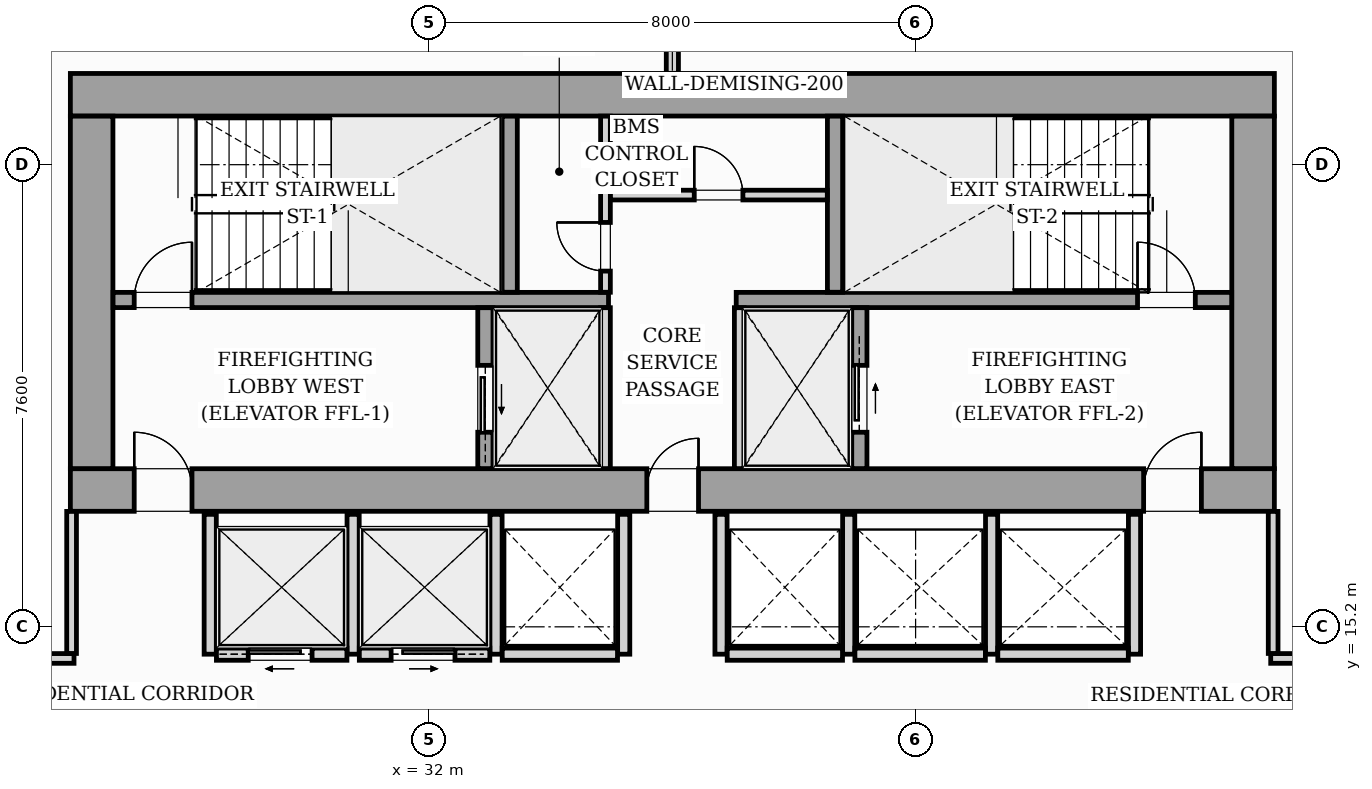
"""IFC4 building model, lengths in metres.
Left out: names, types, materials, properties, quantities, classifications, styles, units other than length and angle.
Written with IfcOpenShell. Run it as: python <this file> out.ifc"""

import sys

from ifc_helpers import new_model, si_unit, direction, frame, frame_2d, origin, origin_2d, place, context, subcontext, project, spatial, rectangle, i_section, extrude, source, transform, mapped, element, fill, save


model = new_model("IFC4")
c1 = context("Model", 3, precision=1e-05, world=origin(), true_north=direction((0.0, 1.0)))
c2 = subcontext(c1, "Body", "Model", "MODEL_VIEW")
j1 = project(units=[si_unit("LENGTHUNIT", "METRE"), si_unit("PLANEANGLEUNIT", "RADIAN")], contexts=[c1])
p1 = place(None, origin())
s1 = spatial("IfcSite", under=j1, at=p1, CompositionType="ELEMENT")
p2 = place(p1, origin())
s2 = spatial("IfcBuilding", under=s1, at=p2, CompositionType="ELEMENT")
p3 = place(p2, frame((0.0, 0.0, 77.8)))
s3 = spatial("IfcBuildingStorey", under=s2, at=p3, CompositionType="ELEMENT", Elevation=77.8)
m1 = source(origin(), c2, "Body", "SweptSolid", [
    extrude(i_section(OverallWidth=0.427, OverallDepth=0.483, WebThickness=0.051, FlangeThickness=0.082, FilletRadius=0.018, at=origin_2d()), origin(), (0.0, 0.0, 1.0), 3.196),
])
for number, where, z_axis, x_axis in (
    (1, (26.4, 17.4, 0.002), (0.0, 0.0, 1.0), (1.0, 0.0, 0.0)),
    (2, (33.12, 17.4, 0.002), (0.0, 0.0, 1.0), (1.0, 0.0, 0.0)),
    (3, (38.88, 17.4, 0.002), (0.0, 0.0, 1.0), (1.0, 0.0, 0.0)),
    (4, (45.6, 17.4, 0.002), (0.0, 0.0, 1.0), (1.0, 0.0, 0.0)),
    (5, (26.4, 24.0, 0.002), (0.0, 0.0, 1.0), (1.0, 0.0, 0.0)),
    (6, (33.12, 24.0, 0.002), (0.0, 0.0, 1.0), (1.0, 0.0, 0.0)),
    (7, (38.88, 24.0, 0.002), (0.0, 0.0, 1.0), (1.0, 0.0, 0.0)),
    (8, (45.6, 24.0, 0.002), (0.0, 0.0, 1.0), (1.0, 0.0, 0.0)),
):
    element("IfcColumn", number, at=place(p3, frame(where, z_axis=z_axis, x_axis=x_axis)), inside=s3, PredefinedType="PILASTER", context=c2, shape_type="MappedRepresentation", body=[
        mapped(m1, transform((0.0, 0.0, 0.0), scale=1.0)),
    ])
p4 = place(p3, frame((11.08, 23.508, 0.0), z_axis=(0.0, 0.0, 1.0), x_axis=(0.995396638587, 0.095841180552, 0.0)))
e9 = element("IfcWall", 9, at=p4, inside=s3, PredefinedType="STANDARD", context=c2, shape_type="SweptSolid", body=[
    extrude(rectangle(XDim=19.11, YDim=0.26, at=frame_2d((9.555, 0.0))), origin(), (0.0, 0.0, 1.0), 2.94),
])
p5 = place(p4, frame((6.896, 0.0, 0.0)))
e10 = element("IfcOpeningElement", 10, at=p5, cuts=e9, PredefinedType="OPENING", context=c2, shape_type="SweptSolid", body=[
    extrude(rectangle(XDim=1.8, YDim=2.06, at=frame_2d((0.9, 1.03))), frame((0.0, 0.14, 0.0), z_axis=(0.0, -1.0, 0.0), x_axis=(1.0, 0.0, 0.0)), (0.0, 0.0, 1.0), 0.28),
])
p6 = place(p4, frame((2.05, 0.0, 0.65)))
e11 = element("IfcOpeningElement", 11, at=p6, cuts=e9, PredefinedType="OPENING", context=c2, shape_type="SweptSolid", body=[
    extrude(rectangle(XDim=1.6, YDim=1.5, at=frame_2d((0.8, 0.75))), frame((0.0, 0.14, 0.0), z_axis=(0.0, -1.0, 0.0), x_axis=(1.0, 0.0, 0.0)), (0.0, 0.0, 1.0), 0.28),
])
p7 = place(p3, frame((26.1, 17.45, 0.0), z_axis=(0.0, 0.0, 1.0), x_axis=(1.0, 0.0, 0.0)))
e12 = element("IfcWall", 12, at=p7, inside=s3, PredefinedType="SHEAR", context=c2, shape_type="SweptSolid", body=[
    extrude(rectangle(XDim=19.8, YDim=0.7, at=frame_2d((9.9, 0.0))), origin(), (0.0, 0.0, 1.0), 3.2),
])
p8 = place(p7, frame((1.05, 0.0, 0.0)))
e13 = element("IfcOpeningElement", 13, at=p8, cuts=e12, PredefinedType="OPENING", context=c2, shape_type="SweptSolid", body=[
    extrude(rectangle(XDim=0.95, YDim=2.06, at=frame_2d((0.475, 1.03))), frame((0.0, 0.36, 0.0), z_axis=(0.0, -1.0, 0.0), x_axis=(1.0, 0.0, 0.0)), (0.0, 0.0, 1.0), 0.72),
])
p9 = place(p7, frame((9.48, 0.0, 0.0)))
e14 = element("IfcOpeningElement", 14, at=p9, cuts=e12, PredefinedType="OPENING", context=c2, shape_type="SweptSolid", body=[
    extrude(rectangle(XDim=0.85, YDim=2.0, at=frame_2d((0.425, 1.0))), frame((0.0, 0.36, 0.0), z_axis=(0.0, -1.0, 0.0), x_axis=(1.0, 0.0, 0.0)), (0.0, 0.0, 1.0), 0.72),
])
p10 = place(p7, frame((17.65, 0.0, 0.0)))
e15 = element("IfcOpeningElement", 15, at=p10, cuts=e12, PredefinedType="OPENING", context=c2, shape_type="SweptSolid", body=[
    extrude(rectangle(XDim=0.95, YDim=2.06, at=frame_2d((0.475, 1.03))), frame((0.0, 0.36, 0.0), z_axis=(0.0, -1.0, 0.0), x_axis=(1.0, 0.0, 0.0)), (0.0, 0.0, 1.0), 0.72),
])
p11 = place(p3, frame((26.1, 23.95, 0.0), z_axis=(0.0, 0.0, 1.0), x_axis=(1.0, 0.0, 0.0)))
e16 = element("IfcWall", 16, at=p11, inside=s3, PredefinedType="SHEAR", context=c2, shape_type="SweptSolid", body=[
    extrude(rectangle(XDim=19.8, YDim=0.7, at=frame_2d((9.9, 0.0))), origin(), (0.0, 0.0, 1.0), 3.2),
])
for number, where, z_axis, x_axis in (
    (17, (26.45, 17.802, 0.0), (0.0, 0.0, 1.0), (0.0, 1.0, 0.0)),
    (18, (45.55, 17.802, 0.0), (0.0, 0.0, 1.0), (0.0, 1.0, 0.0)),
):
    element("IfcWall", number, at=place(p3, frame(where, z_axis=z_axis, x_axis=x_axis)), inside=s3, PredefinedType="SHEAR", context=c2, shape_type="SweptSolid", body=[
        extrude(rectangle(XDim=5.796, YDim=0.7, at=frame_2d((2.898, 0.0))), origin(), (0.0, 0.0, 1.0), 3.2),
    ])
p12 = place(p3, frame((26.802, 20.575, 0.0), z_axis=(0.0, 0.0, 1.0), x_axis=(1.0, 0.0, 0.0)))
e19 = element("IfcWall", 19, at=p12, inside=s3, PredefinedType="SOLIDWALL", context=c2, shape_type="SweptSolid", body=[
    extrude(rectangle(XDim=8.148, YDim=0.25, at=frame_2d((4.074, 0.0))), origin(), (0.0, 0.0, 1.0), 3.2),
])
p13 = place(p12, frame((0.348, 0.0, 0.0)))
e20 = element("IfcOpeningElement", 20, at=p13, cuts=e19, PredefinedType="OPENING", context=c2, shape_type="SweptSolid", body=[
    extrude(rectangle(XDim=0.95, YDim=2.06, at=frame_2d((0.475, 1.03))), frame((0.0, 0.135, 0.0), z_axis=(0.0, -1.0, 0.0), x_axis=(1.0, 0.0, 0.0)), (0.0, 0.0, 1.0), 0.27),
])
p14 = place(p3, frame((37.05, 20.575, 0.0), z_axis=(0.0, 0.0, 1.0), x_axis=(1.0, 0.0, 0.0)))
e21 = element("IfcWall", 21, at=p14, inside=s3, PredefinedType="SOLIDWALL", context=c2, shape_type="SweptSolid", body=[
    extrude(rectangle(XDim=8.148, YDim=0.25, at=frame_2d((4.074, 0.0))), origin(), (0.0, 0.0, 1.0), 3.2),
])
p15 = place(p14, frame((6.6, 0.0, 0.0)))
e22 = element("IfcOpeningElement", 22, at=p15, cuts=e21, PredefinedType="OPENING", context=c2, shape_type="SweptSolid", body=[
    extrude(rectangle(XDim=0.95, YDim=2.06, at=frame_2d((0.475, 1.03))), frame((0.0, 0.135, 0.0), z_axis=(0.0, -1.0, 0.0), x_axis=(1.0, 0.0, 0.0)), (0.0, 0.0, 1.0), 0.27),
])
for number, where, z_axis, x_axis in (
    (23, (33.325, 20.702, 0.0), (0.0, 0.0, 1.0), (0.0, 1.0, 0.0)),
    (24, (38.675, 20.702, 0.0), (0.0, 0.0, 1.0), (0.0, 1.0, 0.0)),
):
    element("IfcWall", number, at=place(p3, frame(where, z_axis=z_axis, x_axis=x_axis)), inside=s3, PredefinedType="SOLIDWALL", context=c2, shape_type="SweptSolid", body=[
        extrude(rectangle(XDim=2.896, YDim=0.25, at=frame_2d((1.448, 0.0))), origin(), (0.0, 0.0, 1.0), 3.2),
    ])
p16 = place(p3, frame((32.925, 17.802, 0.0), z_axis=(0.0, 0.0, 1.0), x_axis=(0.0, 1.0, 0.0)))
e25 = element("IfcWall", 25, at=p16, inside=s3, PredefinedType="SOLIDWALL", context=c2, shape_type="SweptSolid", body=[
    extrude(rectangle(XDim=2.646, YDim=0.25, at=frame_2d((1.323, 0.0))), origin(), (0.0, 0.0, 1.0), 3.2),
])
p17 = place(p16, frame((0.598, 0.0, 0.0)))
e26 = element("IfcOpeningElement", 26, at=p17, cuts=e25, PredefinedType="OPENING", context=c2, shape_type="SweptSolid", body=[
    extrude(rectangle(XDim=1.1, YDim=2.08, at=frame_2d((0.55, 1.04))), frame((0.0, 0.135, 0.0), z_axis=(0.0, -1.0, 0.0), x_axis=(1.0, 0.0, 0.0)), (0.0, 0.0, 1.0), 0.27),
])
for number, where, z_axis, x_axis in (
    (27, (34.9, 17.802, 0.0), (0.0, 0.0, 1.0), (0.0, 1.0, 0.0)),
    (28, (37.1, 17.802, 0.0), (0.0, 0.0, 1.0), (0.0, 1.0, 0.0)),
):
    element("IfcWall", number, at=place(p3, frame(where, z_axis=z_axis, x_axis=x_axis)), inside=s3, PredefinedType="PARTITIONING", context=c2, shape_type="SweptSolid", body=[
        extrude(rectangle(XDim=2.646, YDim=0.16, at=frame_2d((1.323, 0.0))), origin(), (0.0, 0.0, 1.0), 2.94),
    ])
p18 = place(p3, frame((39.075, 17.802, 0.0), z_axis=(0.0, 0.0, 1.0), x_axis=(0.0, 1.0, 0.0)))
e29 = element("IfcWall", 29, at=p18, inside=s3, PredefinedType="SOLIDWALL", context=c2, shape_type="SweptSolid", body=[
    extrude(rectangle(XDim=2.646, YDim=0.25, at=frame_2d((1.323, 0.0))), origin(), (0.0, 0.0, 1.0), 3.2),
])
p19 = place(p18, frame((0.598, 0.0, 0.0)))
e30 = element("IfcOpeningElement", 30, at=p19, cuts=e29, PredefinedType="OPENING", context=c2, shape_type="SweptSolid", body=[
    extrude(rectangle(XDim=1.1, YDim=2.08, at=frame_2d((0.55, 1.04))), frame((0.0, 0.135, 0.0), z_axis=(0.0, -1.0, 0.0), x_axis=(1.0, 0.0, 0.0)), (0.0, 0.0, 1.0), 0.27),
])
p20 = place(p3, frame((34.9, 20.702, 0.0), z_axis=(0.0, 0.0, 1.0), x_axis=(0.0, 1.0, 0.0)))
e31 = element("IfcWall", 31, at=p20, inside=s3, PredefinedType="PARTITIONING", context=c2, shape_type="SweptSolid", body=[
    extrude(rectangle(XDim=2.896, YDim=0.16, at=frame_2d((1.448, 0.0))), origin(), (0.0, 0.0, 1.0), 2.94),
])
p21 = place(p20, frame((0.348, 0.0, 0.0)))
e32 = element("IfcOpeningElement", 32, at=p21, cuts=e31, PredefinedType="OPENING", context=c2, shape_type="SweptSolid", body=[
    extrude(rectangle(XDim=0.8, YDim=2.05, at=frame_2d((0.4, 1.025))), frame((0.0, 0.09, 0.0), z_axis=(0.0, -1.0, 0.0), x_axis=(1.0, 0.0, 0.0)), (0.0, 0.0, 1.0), 0.18),
])
p22 = place(p3, frame((34.982, 22.3, 0.0), z_axis=(0.0, 0.0, 1.0), x_axis=(1.0, 0.0, 0.0)))
e33 = element("IfcWall", 33, at=p22, inside=s3, PredefinedType="PARTITIONING", context=c2, shape_type="SweptSolid", body=[
    extrude(rectangle(XDim=3.566, YDim=0.16, at=frame_2d((1.783, 0.0))), origin(), (0.0, 0.0, 1.0), 2.94),
])
p23 = place(p22, frame((1.378, 0.0, 0.0)))
e34 = element("IfcOpeningElement", 34, at=p23, cuts=e33, PredefinedType="OPENING", context=c2, shape_type="SweptSolid", body=[
    extrude(rectangle(XDim=0.8, YDim=2.05, at=frame_2d((0.4, 1.025))), frame((0.0, 0.09, 0.0), z_axis=(0.0, -1.0, 0.0), x_axis=(1.0, 0.0, 0.0)), (0.0, 0.0, 1.0), 0.18),
])
for number, where, z_axis, x_axis in (
    (35, (28.4, 14.75, 0.0), (0.0, 0.0, 1.0), (0.0, 1.0, 0.0)),
    (36, (30.75, 14.75, 0.0), (0.0, 0.0, 1.0), (0.0, 1.0, 0.0)),
    (37, (33.1, 14.75, 0.0), (0.0, 0.0, 1.0), (0.0, 1.0, 0.0)),
):
    element("IfcWall", number, at=place(p3, frame(where, z_axis=z_axis, x_axis=x_axis)), inside=s3, PredefinedType="PARTITIONING", context=c2, shape_type="SweptSolid", body=[
        extrude(rectangle(XDim=2.3, YDim=0.2, at=frame_2d((1.15, 0.0))), origin(), (0.0, 0.0, 1.0), 2.94),
    ])
p24 = place(p3, frame((28.502, 14.75, 0.0), z_axis=(0.0, 0.0, 1.0), x_axis=(1.0, 0.0, 0.0)))
e38 = element("IfcWall", 38, at=p24, inside=s3, PredefinedType="PARTITIONING", context=c2, shape_type="SweptSolid", body=[
    extrude(rectangle(XDim=2.146, YDim=0.2, at=frame_2d((1.073, 0.0))), origin(), (0.0, 0.0, 1.0), 2.94),
])
p25 = place(p24, frame((0.523, 0.0, 0.0)))
e39 = element("IfcOpeningElement", 39, at=p25, cuts=e38, PredefinedType="OPENING", context=c2, shape_type="SweptSolid", body=[
    extrude(rectangle(XDim=1.05, YDim=2.08, at=frame_2d((0.525, 1.04))), frame((0.0, 0.11, 0.0), z_axis=(0.0, -1.0, 0.0), x_axis=(1.0, 0.0, 0.0)), (0.0, 0.0, 1.0), 0.22),
])
p26 = place(p3, frame((30.852, 14.75, 0.0), z_axis=(0.0, 0.0, 1.0), x_axis=(1.0, 0.0, 0.0)))
e40 = element("IfcWall", 40, at=p26, inside=s3, PredefinedType="PARTITIONING", context=c2, shape_type="SweptSolid", body=[
    extrude(rectangle(XDim=2.146, YDim=0.2, at=frame_2d((1.073, 0.0))), origin(), (0.0, 0.0, 1.0), 2.94),
])
p27 = place(p26, frame((0.523, 0.0, 0.0)))
e41 = element("IfcOpeningElement", 41, at=p27, cuts=e40, PredefinedType="OPENING", context=c2, shape_type="SweptSolid", body=[
    extrude(rectangle(XDim=1.05, YDim=2.08, at=frame_2d((0.525, 1.04))), frame((0.0, 0.11, 0.0), z_axis=(0.0, -1.0, 0.0), x_axis=(1.0, 0.0, 0.0)), (0.0, 0.0, 1.0), 0.22),
])
p28 = place(p3, frame((35.2, 14.75, 0.0), z_axis=(0.0, 0.0, 1.0), x_axis=(0.0, 1.0, 0.0)))
e42 = element("IfcWall", 42, at=p28, inside=s3, PredefinedType="PARTITIONING", context=c2, shape_type="SweptSolid", body=[
    extrude(rectangle(XDim=2.3, YDim=0.2, at=frame_2d((1.15, 0.0))), origin(), (0.0, 0.0, 1.0), 2.94),
])
p29 = place(p3, frame((33.202, 14.75, 0.0), z_axis=(0.0, 0.0, 1.0), x_axis=(1.0, 0.0, 0.0)))
e43 = element("IfcWall", 43, at=p29, inside=s3, PredefinedType="PARTITIONING", context=c2, shape_type="SweptSolid", body=[
    extrude(rectangle(XDim=1.896, YDim=0.2, at=frame_2d((0.948, 0.0))), origin(), (0.0, 0.0, 1.0), 2.94),
])
for number, where, z_axis, x_axis in (
    (44, (36.8, 14.75, 0.0), (0.0, 0.0, 1.0), (0.0, 1.0, 0.0)),
    (45, (38.9, 14.75, 0.0), (0.0, 0.0, 1.0), (0.0, 1.0, 0.0)),
):
    element("IfcWall", number, at=place(p3, frame(where, z_axis=z_axis, x_axis=x_axis)), inside=s3, PredefinedType="PARTITIONING", context=c2, shape_type="SweptSolid", body=[
        extrude(rectangle(XDim=2.3, YDim=0.2, at=frame_2d((1.15, 0.0))), origin(), (0.0, 0.0, 1.0), 2.94),
    ])
p30 = place(p3, frame((36.902, 14.75, 0.0), z_axis=(0.0, 0.0, 1.0), x_axis=(1.0, 0.0, 0.0)))
e46 = element("IfcWall", 46, at=p30, inside=s3, PredefinedType="PARTITIONING", context=c2, shape_type="SweptSolid", body=[
    extrude(rectangle(XDim=1.896, YDim=0.2, at=frame_2d((0.948, 0.0))), origin(), (0.0, 0.0, 1.0), 2.94),
])
for number, where, z_axis, x_axis in (
    (47, (41.25, 14.75, 0.0), (0.0, 0.0, 1.0), (0.0, 1.0, 0.0)),
    (48, (43.6, 14.75, 0.0), (0.0, 0.0, 1.0), (0.0, 1.0, 0.0)),
):
    element("IfcWall", number, at=place(p3, frame(where, z_axis=z_axis, x_axis=x_axis)), inside=s3, PredefinedType="PARTITIONING", context=c2, shape_type="SweptSolid", body=[
        extrude(rectangle(XDim=2.3, YDim=0.2, at=frame_2d((1.15, 0.0))), origin(), (0.0, 0.0, 1.0), 2.94),
    ])
for number, where, z_axis, x_axis in (
    (49, (39.002, 14.75, 0.0), (0.0, 0.0, 1.0), (1.0, 0.0, 0.0)),
    (50, (41.352, 14.75, 0.0), (0.0, 0.0, 1.0), (1.0, 0.0, 0.0)),
):
    element("IfcWall", number, at=place(p3, frame(where, z_axis=z_axis, x_axis=x_axis)), inside=s3, PredefinedType="PARTITIONING", context=c2, shape_type="SweptSolid", body=[
        extrude(rectangle(XDim=2.146, YDim=0.2, at=frame_2d((1.073, 0.0))), origin(), (0.0, 0.0, 1.0), 2.94),
    ])
p31 = place(p3, frame((36.0, 24.302, 0.0), z_axis=(0.0, 0.0, 1.0), x_axis=(0.0, 1.0, 0.0)))
e51 = element("IfcWall", 51, at=p31, inside=s3, PredefinedType="PARTITIONING", context=c2, shape_type="SweptSolid", body=[
    extrude(rectangle(XDim=1.656, YDim=0.2, at=frame_2d((0.828, 0.0))), origin(), (0.0, 0.0, 1.0), 2.94),
])
p32 = place(p3, frame((16.682, 14.68, 0.0), z_axis=(0.0, 0.0, 1.0), x_axis=(1.0, 0.0, 0.0)))
e52 = element("IfcWall", 52, at=p32, inside=s3, PredefinedType="PARTITIONING", context=c2, shape_type="SweptSolid", body=[
    extrude(rectangle(XDim=9.478, YDim=0.16, at=frame_2d((4.739, 0.0))), origin(), (0.0, 0.0, 1.0), 2.94),
])
p33 = place(p32, frame((4.163, 0.0, 0.0)))
e53 = element("IfcOpeningElement", 53, at=p33, cuts=e52, PredefinedType="OPENING", context=c2, shape_type="SweptSolid", body=[
    extrude(rectangle(XDim=0.95, YDim=2.06, at=frame_2d((0.475, 1.03))), frame((0.0, 0.09, 0.0), z_axis=(0.0, -1.0, 0.0), x_axis=(1.0, 0.0, 0.0)), (0.0, 0.0, 1.0), 0.18),
])
p34 = place(p3, frame((26.12, 14.762, 0.0), z_axis=(0.0, 0.0, 1.0), x_axis=(0.0, 1.0, 0.0)))
e54 = element("IfcWall", 54, at=p34, inside=s3, PredefinedType="PARTITIONING", context=c2, shape_type="SweptSolid", body=[
    extrude(rectangle(XDim=2.336, YDim=0.16, at=frame_2d((1.168, 0.0))), origin(), (0.0, 0.0, 1.0), 2.94),
])
p35 = place(p3, frame((45.84, 14.68, 0.0), z_axis=(0.0, 0.0, 1.0), x_axis=(1.0, 0.0, 0.0)))
e55 = element("IfcWall", 55, at=p35, inside=s3, PredefinedType="PARTITIONING", context=c2, shape_type="SweptSolid", body=[
    extrude(rectangle(XDim=8.278, YDim=0.16, at=frame_2d((4.139, 0.0))), origin(), (0.0, 0.0, 1.0), 2.94),
])
p36 = place(p35, frame((3.765, 0.0, 0.0)))
e56 = element("IfcOpeningElement", 56, at=p36, cuts=e55, PredefinedType="OPENING", context=c2, shape_type="SweptSolid", body=[
    extrude(rectangle(XDim=0.95, YDim=2.06, at=frame_2d((0.475, 1.03))), frame((0.0, 0.09, 0.0), z_axis=(0.0, -1.0, 0.0), x_axis=(1.0, 0.0, 0.0)), (0.0, 0.0, 1.0), 0.18),
])
p37 = place(p3, frame((45.88, 14.762, 0.0), z_axis=(0.0, 0.0, 1.0), x_axis=(0.0, 1.0, 0.0)))
e57 = element("IfcWall", 57, at=p37, inside=s3, PredefinedType="PARTITIONING", context=c2, shape_type="SweptSolid", body=[
    extrude(rectangle(XDim=2.336, YDim=0.16, at=frame_2d((1.168, 0.0))), origin(), (0.0, 0.0, 1.0), 2.94),
])
m2 = source(origin(), c2, "Body", "SweptSolid", [
    extrude(rectangle(XDim=0.95, YDim=2.06, at=frame_2d((0.475, 1.03))), frame((0.0, 0.025, 0.0), z_axis=(0.0, -1.0, 0.0), x_axis=(1.0, 0.0, 0.0)), (0.0, 0.0, 1.0), 0.05),
])
p38 = place(p8, origin())
e58 = element("IfcDoor", 58, at=p38, inside=s3, OperationType="SINGLE_SWING_LEFT", PredefinedType="DOOR", context=c2, shape_type="MappedRepresentation", body=[
    mapped(m2, transform((0.0, 0.0, 0.0), scale=1.0)),
])
fill(e13, e58)
m3 = source(origin(), c2, "Body", "SweptSolid", [
    extrude(rectangle(XDim=0.85, YDim=2.0, at=frame_2d((0.425, 1.0))), frame((0.0, 0.025, 0.0), z_axis=(0.0, -1.0, 0.0), x_axis=(1.0, 0.0, 0.0)), (0.0, 0.0, 1.0), 0.05),
])
p39 = place(p9, origin())
e59 = element("IfcDoor", 59, at=p39, inside=s3, OperationType="SINGLE_SWING_RIGHT", PredefinedType="DOOR", context=c2, shape_type="MappedRepresentation", body=[
    mapped(m3, transform((0.0, 0.0, 0.0), scale=1.0)),
])
fill(e14, e59)
p40 = place(p10, origin())
e60 = element("IfcDoor", 60, at=p40, inside=s3, OperationType="SINGLE_SWING_RIGHT", PredefinedType="DOOR", context=c2, shape_type="MappedRepresentation", body=[
    mapped(m2, transform((0.0, 0.0, 0.0), scale=1.0)),
])
fill(e15, e60)
p41 = place(p13, origin())
e61 = element("IfcDoor", 61, at=p41, inside=s3, OperationType="SINGLE_SWING_RIGHT", PredefinedType="DOOR", context=c2, shape_type="MappedRepresentation", body=[
    mapped(m2, transform((0.0, 0.0, 0.0), scale=1.0)),
])
fill(e20, e61)
p42 = place(p15, origin())
e62 = element("IfcDoor", 62, at=p42, inside=s3, OperationType="SINGLE_SWING_LEFT", PredefinedType="DOOR", context=c2, shape_type="MappedRepresentation", body=[
    mapped(m2, transform((0.0, 0.0, 0.0), scale=1.0)),
])
fill(e22, e62)
m4 = source(origin(), c2, "Body", "SweptSolid", [
    extrude(rectangle(XDim=1.1, YDim=2.08, at=frame_2d((0.55, 1.04))), frame((0.0, 0.025, 0.0), z_axis=(0.0, -1.0, 0.0), x_axis=(1.0, 0.0, 0.0)), (0.0, 0.0, 1.0), 0.05),
])
p43 = place(p17, origin())
e63 = element("IfcDoor", 63, at=p43, inside=s3, OperationType="SLIDING_TO_LEFT", PredefinedType="DOOR", context=c2, shape_type="MappedRepresentation", body=[
    mapped(m4, transform((0.0, 0.0, 0.0), scale=1.0)),
])
fill(e26, e63)
p44 = place(p19, origin())
e64 = element("IfcDoor", 64, at=p44, inside=s3, OperationType="SLIDING_TO_RIGHT", PredefinedType="DOOR", context=c2, shape_type="MappedRepresentation", body=[
    mapped(m4, transform((0.0, 0.0, 0.0), scale=1.0)),
])
fill(e30, e64)
m5 = source(origin(), c2, "Body", "SweptSolid", [
    extrude(rectangle(XDim=0.8, YDim=2.05, at=frame_2d((0.4, 1.025))), frame((0.0, 0.025, 0.0), z_axis=(0.0, -1.0, 0.0), x_axis=(1.0, 0.0, 0.0)), (0.0, 0.0, 1.0), 0.05),
])
p45 = place(p21, origin())
e65 = element("IfcDoor", 65, at=p45, inside=s3, OperationType="SINGLE_SWING_RIGHT", PredefinedType="DOOR", context=c2, shape_type="MappedRepresentation", body=[
    mapped(m5, transform((0.0, 0.0, 0.0), scale=1.0)),
])
fill(e32, e65)
p46 = place(p23, origin())
e66 = element("IfcDoor", 66, at=p46, inside=s3, OperationType="SINGLE_SWING_LEFT", PredefinedType="DOOR", context=c2, shape_type="MappedRepresentation", body=[
    mapped(m5, transform((0.0, 0.0, 0.0), scale=1.0)),
])
fill(e34, e66)
m6 = source(origin(), c2, "Body", "SweptSolid", [
    extrude(rectangle(XDim=1.05, YDim=2.08, at=frame_2d((0.525, 1.04))), frame((0.0, 0.025, 0.0), z_axis=(0.0, -1.0, 0.0), x_axis=(1.0, 0.0, 0.0)), (0.0, 0.0, 1.0), 0.05),
])
p47 = place(p25, origin())
e67 = element("IfcDoor", 67, at=p47, inside=s3, OperationType="SLIDING_TO_LEFT", PredefinedType="DOOR", context=c2, shape_type="MappedRepresentation", body=[
    mapped(m6, transform((0.0, 0.0, 0.0), scale=1.0)),
])
fill(e39, e67)
p48 = place(p27, origin())
e68 = element("IfcDoor", 68, at=p48, inside=s3, OperationType="SLIDING_TO_RIGHT", PredefinedType="DOOR", context=c2, shape_type="MappedRepresentation", body=[
    mapped(m6, transform((0.0, 0.0, 0.0), scale=1.0)),
])
fill(e41, e68)
save(model, sys.argv[1])
